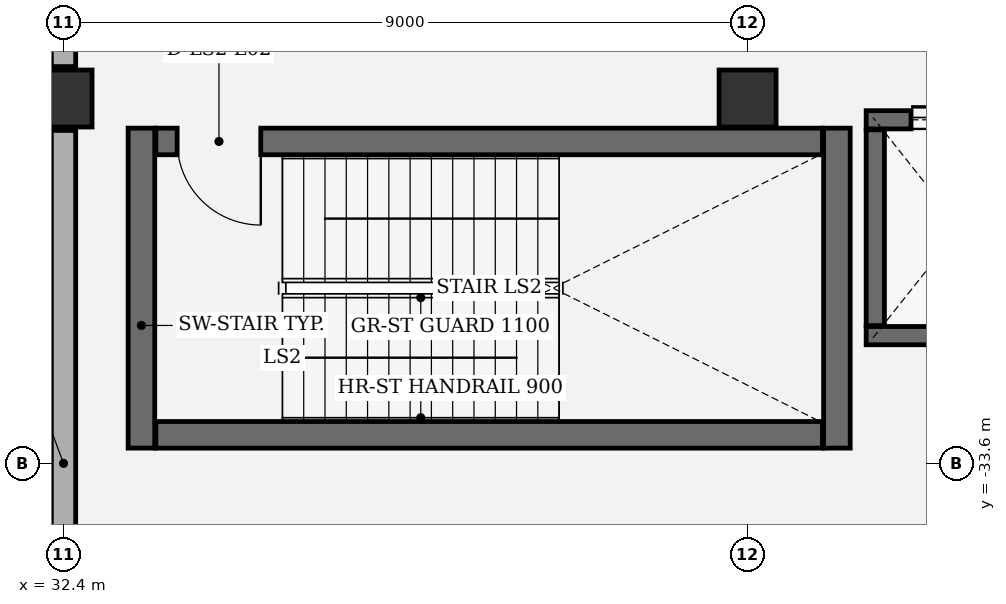
"""IFC4 building model, lengths in metres.
Left out: names, types, materials, properties, quantities, classifications, styles, units other than length and angle.
Written with IfcOpenShell. Run it as: python <this file> out.ifc"""

import sys

from ifc_helpers import new_model, si_unit, direction, frame, frame_2d, origin, origin_2d, place, context, subcontext, project, spatial, rectangle, extrude, element, fill, save


model = new_model("IFC4")
c1 = context("Model", 3, precision=1e-05, world=origin(), true_north=direction((0.0, 1.0)))
c2 = subcontext(c1, "Body", "Model", "MODEL_VIEW")
j1 = project(units=[si_unit("LENGTHUNIT", "METRE"), si_unit("PLANEANGLEUNIT", "RADIAN")], contexts=[c1])
p1 = place(None, origin())
s1 = spatial("IfcSite", under=j1, at=p1, CompositionType="ELEMENT")
p2 = place(p1, origin())
s2 = spatial("IfcBuilding", under=s1, at=p2, CompositionType="ELEMENT")
p3 = place(p2, frame((0.0, 0.0, 12.0)))
s3 = spatial("IfcBuildingStorey", under=s2, at=p3, CompositionType="ELEMENT", Elevation=12.0)
for number, where, z_axis, x_axis in (
    (1, (32.4, -28.8, 0.0), (0.0, 0.0, 1.0), (1.0, 0.0, 0.0)),
    (2, (41.4, -28.8, 0.0), (0.0, 0.0, 1.0), (1.0, 0.0, 0.0)),
):
    element("IfcColumn", number, at=place(p3, frame(where, z_axis=z_axis, x_axis=x_axis)), inside=s3, PredefinedType="COLUMN", context=c2, shape_type="SweptSolid", body=[
        extrude(rectangle(XDim=0.75, YDim=0.75, at=origin_2d()), origin(), (0.0, 0.0, 1.0), 5.0),
    ])
p4 = place(p3, frame((32.4, -37.98, 0.0), z_axis=(0.0, 0.0, 1.0), x_axis=(0.0, 1.0, 0.0)))
e3 = element("IfcWall", 3, at=p4, inside=s3, PredefinedType="SOLIDWALL", context=c2, shape_type="SweptSolid", body=[
    extrude(rectangle(XDim=8.76, YDim=0.32, at=frame_2d((4.38, 0.0))), origin(), (0.0, 0.0, 1.0), 3.937),
])
p5 = place(p3, frame((32.4, -28.38, 0.0), z_axis=(0.0, 0.0, 1.0), x_axis=(0.0, 1.0, 0.0)))
e4 = element("IfcWall", 4, at=p5, inside=s3, PredefinedType="SOLIDWALL", context=c2, shape_type="SweptSolid", body=[
    extrude(rectangle(XDim=8.76, YDim=0.32, at=frame_2d((4.38, 0.0))), origin(), (0.0, 0.0, 1.0), 3.937),
])
for number, where, z_axis, x_axis in (
    (5, (33.425, -29.19, 0.0), (0.0, 0.0, 1.0), (0.0, -1.0, 0.0)),
    (6, (42.575, -33.4, 0.0), (0.0, 0.0, 1.0), (0.0, 1.0, 0.0)),
):
    element("IfcWall", number, at=place(p3, frame(where, z_axis=z_axis, x_axis=x_axis)), inside=s3, PredefinedType="SHEAR", context=c2, shape_type="SweptSolid", body=[
        extrude(rectangle(XDim=4.21, YDim=0.35, at=frame_2d((2.105, 0.0))), origin(), (0.0, 0.0, 1.0), 4.995),
    ])
p6 = place(p3, frame((33.615, -33.225, 0.0), z_axis=(0.0, 0.0, 1.0), x_axis=(1.0, 0.0, 0.0)))
e7 = element("IfcWall", 7, at=p6, inside=s3, PredefinedType="SHEAR", context=c2, shape_type="SweptSolid", body=[
    extrude(rectangle(XDim=8.77, YDim=0.35, at=frame_2d((4.385, 0.0))), origin(), (0.0, 0.0, 1.0), 4.995),
])
p7 = place(p3, frame((42.385, -29.365, 0.0), z_axis=(0.0, 0.0, 1.0), x_axis=(-1.0, 0.0, 0.0)))
e8 = element("IfcWall", 8, at=p7, inside=s3, PredefinedType="SHEAR", context=c2, shape_type="SweptSolid", body=[
    extrude(rectangle(XDim=8.77, YDim=0.35, at=frame_2d((4.385, 0.0))), origin(), (0.0, 0.0, 1.0), 4.995),
])
p8 = place(p7, frame((7.39, 0.0, 0.0)))
e9 = element("IfcOpeningElement", 9, at=p8, cuts=e8, PredefinedType="OPENING", context=c2, shape_type="SweptSolid", body=[
    extrude(rectangle(XDim=1.1, YDim=2.2, at=frame_2d((0.55, 1.1))), frame((0.0, 0.185, 0.0), z_axis=(0.0, -1.0, 0.0), x_axis=(1.0, 0.0, 0.0)), (0.0, 0.0, 1.0), 0.37),
])
p9 = place(p3, frame((45.44, -31.92, 0.0), z_axis=(0.0, 0.0, 1.0), x_axis=(-1.0, 0.0, 0.0)))
e10 = element("IfcWall", 10, at=p9, inside=s3, PredefinedType="SHEAR", context=c2, shape_type="SweptSolid", body=[
    extrude(rectangle(XDim=2.48, YDim=0.24, at=frame_2d((1.24, 0.0))), origin(), (0.0, 0.0, 1.0), 4.74),
])
p10 = place(p3, frame((42.96, -29.08, 0.0), z_axis=(0.0, 0.0, 1.0), x_axis=(1.0, 0.0, 0.0)))
e11 = element("IfcWall", 11, at=p10, inside=s3, PredefinedType="SHEAR", context=c2, shape_type="SweptSolid", body=[
    extrude(rectangle(XDim=2.48, YDim=0.24, at=frame_2d((1.24, 0.0))), origin(), (0.0, 0.0, 1.0), 4.74),
])
p11 = place(p10, frame((0.59, 0.0, 0.0)))
e12 = element("IfcOpeningElement", 12, at=p11, cuts=e11, PredefinedType="OPENING", context=c2, shape_type="SweptSolid", body=[
    extrude(rectangle(XDim=1.3, YDim=2.3, at=frame_2d((0.65, 1.15))), frame((0.0, 0.13, 0.0), z_axis=(0.0, -1.0, 0.0), x_axis=(1.0, 0.0, 0.0)), (0.0, 0.0, 1.0), 0.26),
])
p12 = place(p3, frame((43.08, -31.788, 0.0), z_axis=(0.0, 0.0, 1.0), x_axis=(0.0, 1.0, 0.0)))
e13 = element("IfcWall", 13, at=p12, inside=s3, PredefinedType="SHEAR", context=c2, shape_type="SweptSolid", body=[
    extrude(rectangle(XDim=2.576, YDim=0.24, at=frame_2d((1.288, 0.0))), origin(), (0.0, 0.0, 1.0), 4.74),
])
p13 = place(p8, origin())
e14 = element("IfcDoor", 14, at=p13, inside=s3, OperationType="SINGLE_SWING_LEFT", PredefinedType="DOOR", context=c2, shape_type="SweptSolid", body=[
    extrude(rectangle(XDim=1.1, YDim=2.2, at=frame_2d((0.55, 1.1))), frame((0.0, 0.025, 0.0), z_axis=(0.0, -1.0, 0.0), x_axis=(1.0, 0.0, 0.0)), (0.0, 0.0, 1.0), 0.05),
])
fill(e9, e14)
p14 = place(p11, origin())
e15 = element("IfcDoor", 15, at=p14, inside=s3, OperationType="DOUBLE_DOOR_SLIDING", PredefinedType="DOOR", context=c2, shape_type="SweptSolid", body=[
    extrude(rectangle(XDim=1.3, YDim=2.3, at=frame_2d((0.65, 1.15))), frame((0.0, 0.025, 0.0), z_axis=(0.0, -1.0, 0.0), x_axis=(1.0, 0.0, 0.0)), (0.0, 0.0, 1.0), 0.05),
])
fill(e12, e15)
save(model, sys.argv[1])
